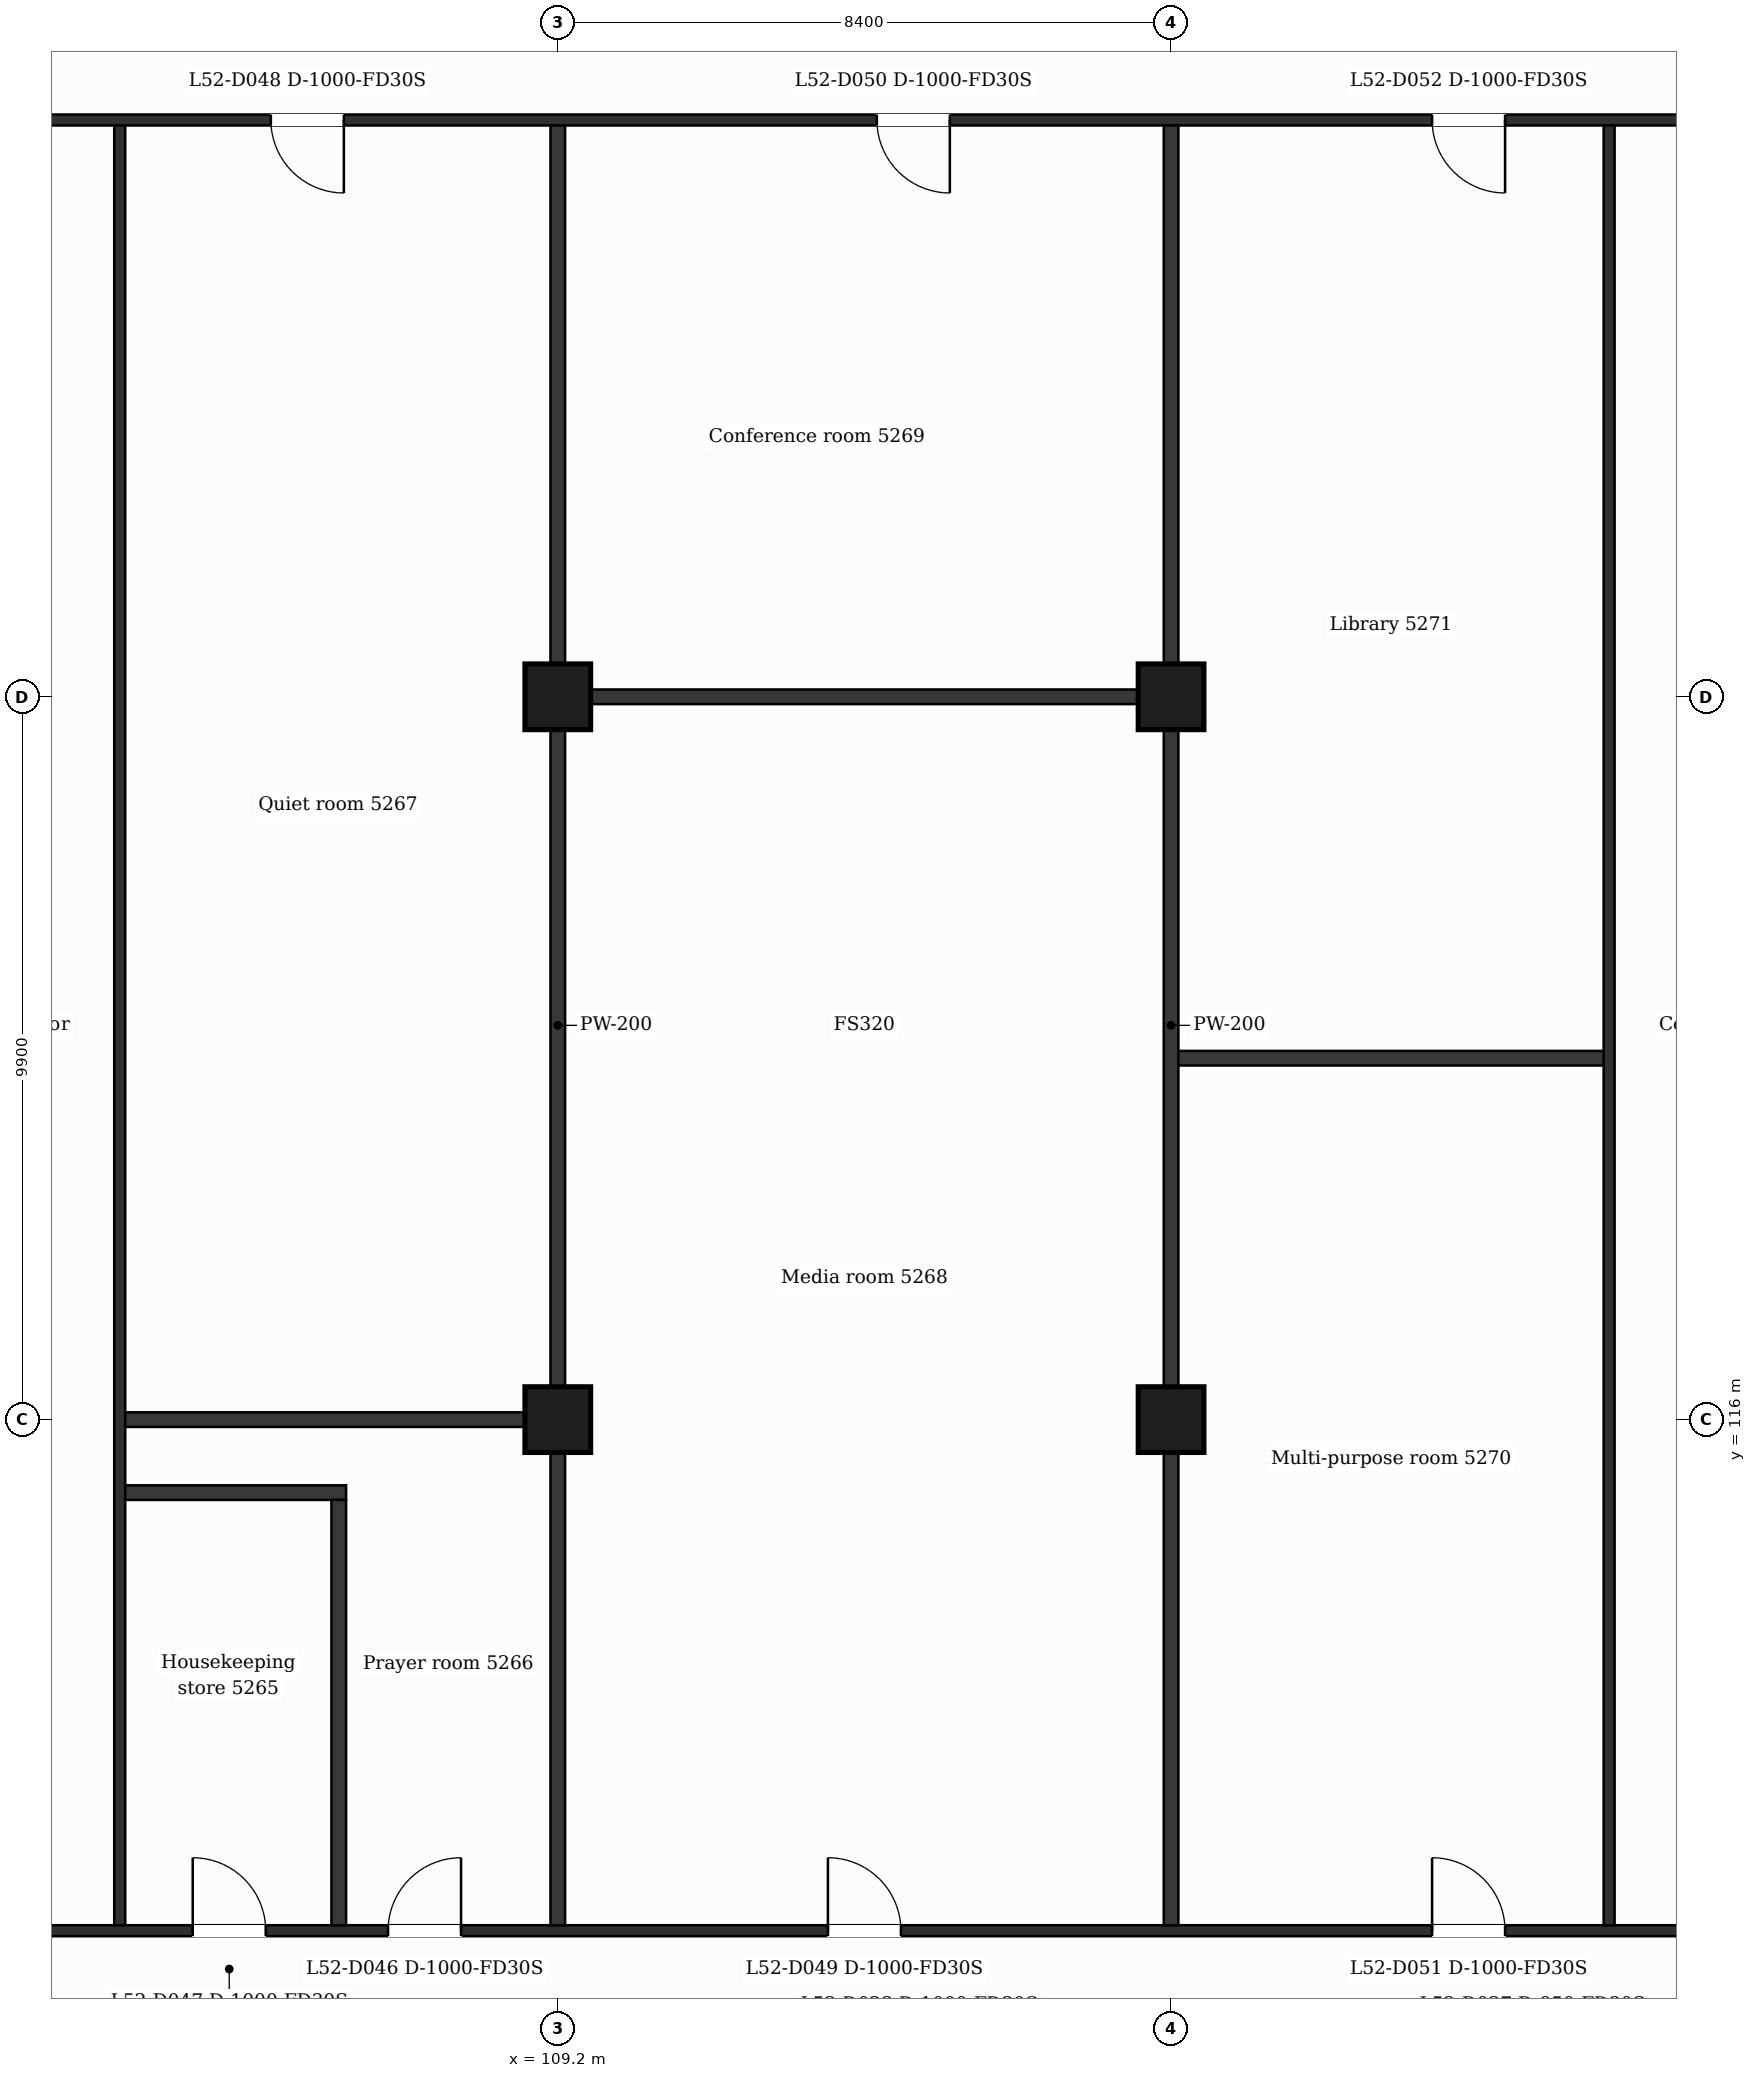
"""IFC4 building model, lengths in metres.
Left out: names, types, materials, properties, quantities, classifications, styles, units other than length and angle.
Written with IfcOpenShell. Run it as: python <this file> out.ifc"""

import sys

from ifc_helpers import new_model, si_unit, direction, frame, frame_2d, origin, origin_2d, place, context, subcontext, project, spatial, rectangle, extrude, element, fill, save


model = new_model("IFC4")
c1 = context("Model", 3, precision=1e-05, world=origin(), true_north=direction((0.0, 1.0)))
c2 = subcontext(c1, "Body", "Model", "MODEL_VIEW")
j1 = project(units=[si_unit("LENGTHUNIT", "METRE"), si_unit("PLANEANGLEUNIT", "RADIAN")], contexts=[c1])
p1 = place(None, origin())
s1 = spatial("IfcSite", under=j1, at=p1, CompositionType="ELEMENT")
p2 = place(p1, origin())
s2 = spatial("IfcBuilding", under=s1, at=p2, CompositionType="ELEMENT")
p3 = place(p2, frame((0.0, 0.0, 217.0)))
s3 = spatial("IfcBuildingStorey", under=s2, at=p3, CompositionType="ELEMENT", Elevation=217.0)
for number, where, z_axis, x_axis in (
    (1, (109.2, 116.0, 0.0), (0.0, 0.0, 1.0), (1.0, 0.0, 0.0)),
    (2, (117.6, 116.0, 0.0), (0.0, 0.0, 1.0), (1.0, 0.0, 0.0)),
    (3, (109.2, 125.9, 0.0), (0.0, 0.0, 1.0), (1.0, 0.0, 0.0)),
    (4, (117.6, 125.9, 0.0), (0.0, 0.0, 1.0), (1.0, 0.0, 0.0)),
):
    element("IfcColumn", number, at=place(p3, frame(where, z_axis=z_axis, x_axis=x_axis)), inside=s3, PredefinedType="COLUMN", context=c2, shape_type="SweptSolid", body=[
        extrude(rectangle(XDim=0.9, YDim=0.9, at=origin_2d()), origin(), (0.0, 0.0, 1.0), 3.7),
    ])
p4 = place(p3, frame((100.725, 109.0, 0.0), z_axis=(0.0, 0.0, 1.0), x_axis=(1.0, 0.0, 0.0)))
e5 = element("IfcWall", 5, at=p4, inside=s3, PredefinedType="PARTITIONING", context=c2, shape_type="SweptSolid", body=[
    extrude(rectangle(XDim=25.35, YDim=0.15, at=frame_2d((12.675, 0.0))), origin(), (0.0, 0.0, 1.0), 3.38),
])
p5 = place(p4, frame((6.15, 0.0, 0.0)))
e6 = element("IfcOpeningElement", 6, at=p5, cuts=e5, PredefinedType="OPENING", context=c2, shape_type="SweptSolid", body=[
    extrude(rectangle(XDim=1.0, YDim=2.1, at=frame_2d((0.5, 1.05))), frame((0.0, 0.085, 0.0), z_axis=(0.0, -1.0, 0.0), x_axis=(1.0, 0.0, 0.0)), (0.0, 0.0, 1.0), 0.17),
])
p6 = place(p4, frame((3.475, 0.0, 0.0)))
e7 = element("IfcOpeningElement", 7, at=p6, cuts=e5, PredefinedType="OPENING", context=c2, shape_type="SweptSolid", body=[
    extrude(rectangle(XDim=1.0, YDim=2.1, at=frame_2d((0.5, 1.05))), frame((0.0, 0.085, 0.0), z_axis=(0.0, -1.0, 0.0), x_axis=(1.0, 0.0, 0.0)), (0.0, 0.0, 1.0), 0.17),
])
p7 = place(p4, frame((12.175, 0.0, 0.0)))
e8 = element("IfcOpeningElement", 8, at=p7, cuts=e5, PredefinedType="OPENING", context=c2, shape_type="SweptSolid", body=[
    extrude(rectangle(XDim=1.0, YDim=2.1, at=frame_2d((0.5, 1.05))), frame((0.0, 0.085, 0.0), z_axis=(0.0, -1.0, 0.0), x_axis=(1.0, 0.0, 0.0)), (0.0, 0.0, 1.0), 0.17),
])
p8 = place(p4, frame((20.45, 0.0, 0.0)))
e9 = element("IfcOpeningElement", 9, at=p8, cuts=e5, PredefinedType="OPENING", context=c2, shape_type="SweptSolid", body=[
    extrude(rectangle(XDim=1.0, YDim=2.1, at=frame_2d((0.5, 1.05))), frame((0.0, 0.085, 0.0), z_axis=(0.0, -1.0, 0.0), x_axis=(1.0, 0.0, 0.0)), (0.0, 0.0, 1.0), 0.17),
])
p9 = place(p3, frame((103.2, 115.0, 0.0), z_axis=(0.0, 0.0, 1.0), x_axis=(1.0, 0.0, 0.0)))
e10 = element("IfcWall", 10, at=p9, inside=s3, PredefinedType="PARTITIONING", context=c2, shape_type="SweptSolid", body=[
    extrude(rectangle(XDim=3.1, YDim=0.2, at=frame_2d((1.55, 0.0))), origin(), (0.0, 0.0, 1.0), 3.38),
])
for number, where, z_axis, x_axis in (
    (11, (103.2, 116.0, 0.0), (0.0, 0.0, 1.0), (1.0, 0.0, 0.0)),
    (12, (117.6, 120.95, 0.0), (0.0, 0.0, 1.0), (1.0, 0.0, 0.0)),
):
    element("IfcWall", number, at=place(p3, frame(where, z_axis=z_axis, x_axis=x_axis)), inside=s3, PredefinedType="PARTITIONING", context=c2, shape_type="SweptSolid", body=[
        extrude(rectangle(XDim=6.0, YDim=0.2, at=frame_2d((3.0, 0.0))), origin(), (0.0, 0.0, 1.0), 3.38),
    ])
p10 = place(p3, frame((109.2, 125.9, 0.0), z_axis=(0.0, 0.0, 1.0), x_axis=(1.0, 0.0, 0.0)))
e13 = element("IfcWall", 13, at=p10, inside=s3, PredefinedType="PARTITIONING", context=c2, shape_type="SweptSolid", body=[
    extrude(rectangle(XDim=8.4, YDim=0.2, at=frame_2d((4.2, 0.0))), origin(), (0.0, 0.0, 1.0), 3.38),
])
p11 = place(p3, frame((100.725, 133.8, 0.0), z_axis=(0.0, 0.0, 1.0), x_axis=(1.0, 0.0, 0.0)))
e14 = element("IfcWall", 14, at=p11, inside=s3, PredefinedType="PARTITIONING", context=c2, shape_type="SweptSolid", body=[
    extrude(rectangle(XDim=25.35, YDim=0.15, at=frame_2d((12.675, 0.0))), origin(), (0.0, 0.0, 1.0), 3.38),
])
p12 = place(p11, frame((4.545, 0.0, 0.0)))
e15 = element("IfcOpeningElement", 15, at=p12, cuts=e14, PredefinedType="OPENING", context=c2, shape_type="SweptSolid", body=[
    extrude(rectangle(XDim=1.0, YDim=2.1, at=frame_2d((0.5, 1.05))), frame((0.0, 0.085, 0.0), z_axis=(0.0, -1.0, 0.0), x_axis=(1.0, 0.0, 0.0)), (0.0, 0.0, 1.0), 0.17),
])
p13 = place(p11, frame((12.845, 0.0, 0.0)))
e16 = element("IfcOpeningElement", 16, at=p13, cuts=e14, PredefinedType="OPENING", context=c2, shape_type="SweptSolid", body=[
    extrude(rectangle(XDim=1.0, YDim=2.1, at=frame_2d((0.5, 1.05))), frame((0.0, 0.085, 0.0), z_axis=(0.0, -1.0, 0.0), x_axis=(1.0, 0.0, 0.0)), (0.0, 0.0, 1.0), 0.17),
])
p14 = place(p11, frame((20.45, 0.0, 0.0)))
e17 = element("IfcOpeningElement", 17, at=p14, cuts=e14, PredefinedType="OPENING", context=c2, shape_type="SweptSolid", body=[
    extrude(rectangle(XDim=1.0, YDim=2.1, at=frame_2d((0.5, 1.05))), frame((0.0, 0.085, 0.0), z_axis=(0.0, -1.0, 0.0), x_axis=(1.0, 0.0, 0.0)), (0.0, 0.0, 1.0), 0.17),
])
p15 = place(p3, frame((103.2, 109.075, 0.0), z_axis=(0.0, 0.0, 1.0), x_axis=(0.0, 1.0, 0.0)))
e18 = element("IfcWall", 18, at=p15, inside=s3, PredefinedType="PARTITIONING", context=c2, shape_type="SweptSolid", body=[
    extrude(rectangle(XDim=24.65, YDim=0.15, at=frame_2d((12.325, 0.0))), origin(), (0.0, 0.0, 1.0), 3.38),
])
p16 = place(p3, frame((106.2, 109.075, 0.0), z_axis=(0.0, 0.0, 1.0), x_axis=(0.0, 1.0, 0.0)))
e19 = element("IfcWall", 19, at=p16, inside=s3, PredefinedType="PARTITIONING", context=c2, shape_type="SweptSolid", body=[
    extrude(rectangle(XDim=5.825, YDim=0.2, at=frame_2d((2.913, 0.0))), origin(), (0.0, 0.0, 1.0), 3.38),
])
for number, where, z_axis, x_axis in (
    (20, (109.2, 109.075, 0.0), (0.0, 0.0, 1.0), (0.0, 1.0, 0.0)),
    (21, (117.6, 109.075, 0.0), (0.0, 0.0, 1.0), (0.0, 1.0, 0.0)),
):
    element("IfcWall", number, at=place(p3, frame(where, z_axis=z_axis, x_axis=x_axis)), inside=s3, PredefinedType="PARTITIONING", context=c2, shape_type="SweptSolid", body=[
        extrude(rectangle(XDim=24.65, YDim=0.2, at=frame_2d((12.325, 0.0))), origin(), (0.0, 0.0, 1.0), 3.38),
    ])
p17 = place(p3, frame((123.6, 109.075, 0.0), z_axis=(0.0, 0.0, 1.0), x_axis=(0.0, 1.0, 0.0)))
e22 = element("IfcWall", 22, at=p17, inside=s3, PredefinedType="PARTITIONING", context=c2, shape_type="SweptSolid", body=[
    extrude(rectangle(XDim=24.65, YDim=0.15, at=frame_2d((12.325, 0.0))), origin(), (0.0, 0.0, 1.0), 3.38),
])
p18 = place(p5, origin())
e23 = element("IfcDoor", 23, at=p18, inside=s3, OperationType="SINGLE_SWING_RIGHT", PredefinedType="DOOR", context=c2, shape_type="SweptSolid", body=[
    extrude(rectangle(XDim=1.0, YDim=2.1, at=frame_2d((0.5, 1.05))), frame((0.0, 0.025, 0.0), z_axis=(0.0, -1.0, 0.0), x_axis=(1.0, 0.0, 0.0)), (0.0, 0.0, 1.0), 0.05),
])
fill(e6, e23)
p19 = place(p6, origin())
e24 = element("IfcDoor", 24, at=p19, inside=s3, OperationType="SINGLE_SWING_LEFT", PredefinedType="DOOR", context=c2, shape_type="SweptSolid", body=[
    extrude(rectangle(XDim=1.0, YDim=2.1, at=frame_2d((0.5, 1.05))), frame((0.0, 0.025, 0.0), z_axis=(0.0, -1.0, 0.0), x_axis=(1.0, 0.0, 0.0)), (0.0, 0.0, 1.0), 0.05),
])
fill(e7, e24)
p20 = place(p12, origin())
e25 = element("IfcDoor", 25, at=p20, inside=s3, OperationType="SINGLE_SWING_RIGHT", PredefinedType="DOOR", context=c2, shape_type="SweptSolid", body=[
    extrude(rectangle(XDim=1.0, YDim=2.1, at=frame_2d((0.5, 1.05))), frame((0.0, 0.025, 0.0), z_axis=(0.0, -1.0, 0.0), x_axis=(1.0, 0.0, 0.0)), (0.0, 0.0, 1.0), 0.05),
])
fill(e15, e25)
p21 = place(p7, origin())
e26 = element("IfcDoor", 26, at=p21, inside=s3, OperationType="SINGLE_SWING_LEFT", PredefinedType="DOOR", context=c2, shape_type="SweptSolid", body=[
    extrude(rectangle(XDim=1.0, YDim=2.1, at=frame_2d((0.5, 1.05))), frame((0.0, 0.025, 0.0), z_axis=(0.0, -1.0, 0.0), x_axis=(1.0, 0.0, 0.0)), (0.0, 0.0, 1.0), 0.05),
])
fill(e8, e26)
p22 = place(p13, origin())
e27 = element("IfcDoor", 27, at=p22, inside=s3, OperationType="SINGLE_SWING_RIGHT", PredefinedType="DOOR", context=c2, shape_type="SweptSolid", body=[
    extrude(rectangle(XDim=1.0, YDim=2.1, at=frame_2d((0.5, 1.05))), frame((0.0, 0.025, 0.0), z_axis=(0.0, -1.0, 0.0), x_axis=(1.0, 0.0, 0.0)), (0.0, 0.0, 1.0), 0.05),
])
fill(e16, e27)
p23 = place(p8, origin())
e28 = element("IfcDoor", 28, at=p23, inside=s3, OperationType="SINGLE_SWING_LEFT", PredefinedType="DOOR", context=c2, shape_type="SweptSolid", body=[
    extrude(rectangle(XDim=1.0, YDim=2.1, at=frame_2d((0.5, 1.05))), frame((0.0, 0.025, 0.0), z_axis=(0.0, -1.0, 0.0), x_axis=(1.0, 0.0, 0.0)), (0.0, 0.0, 1.0), 0.05),
])
fill(e9, e28)
p24 = place(p14, origin())
e29 = element("IfcDoor", 29, at=p24, inside=s3, OperationType="SINGLE_SWING_RIGHT", PredefinedType="DOOR", context=c2, shape_type="SweptSolid", body=[
    extrude(rectangle(XDim=1.0, YDim=2.1, at=frame_2d((0.5, 1.05))), frame((0.0, 0.025, 0.0), z_axis=(0.0, -1.0, 0.0), x_axis=(1.0, 0.0, 0.0)), (0.0, 0.0, 1.0), 0.05),
])
fill(e17, e29)
save(model, sys.argv[1])
